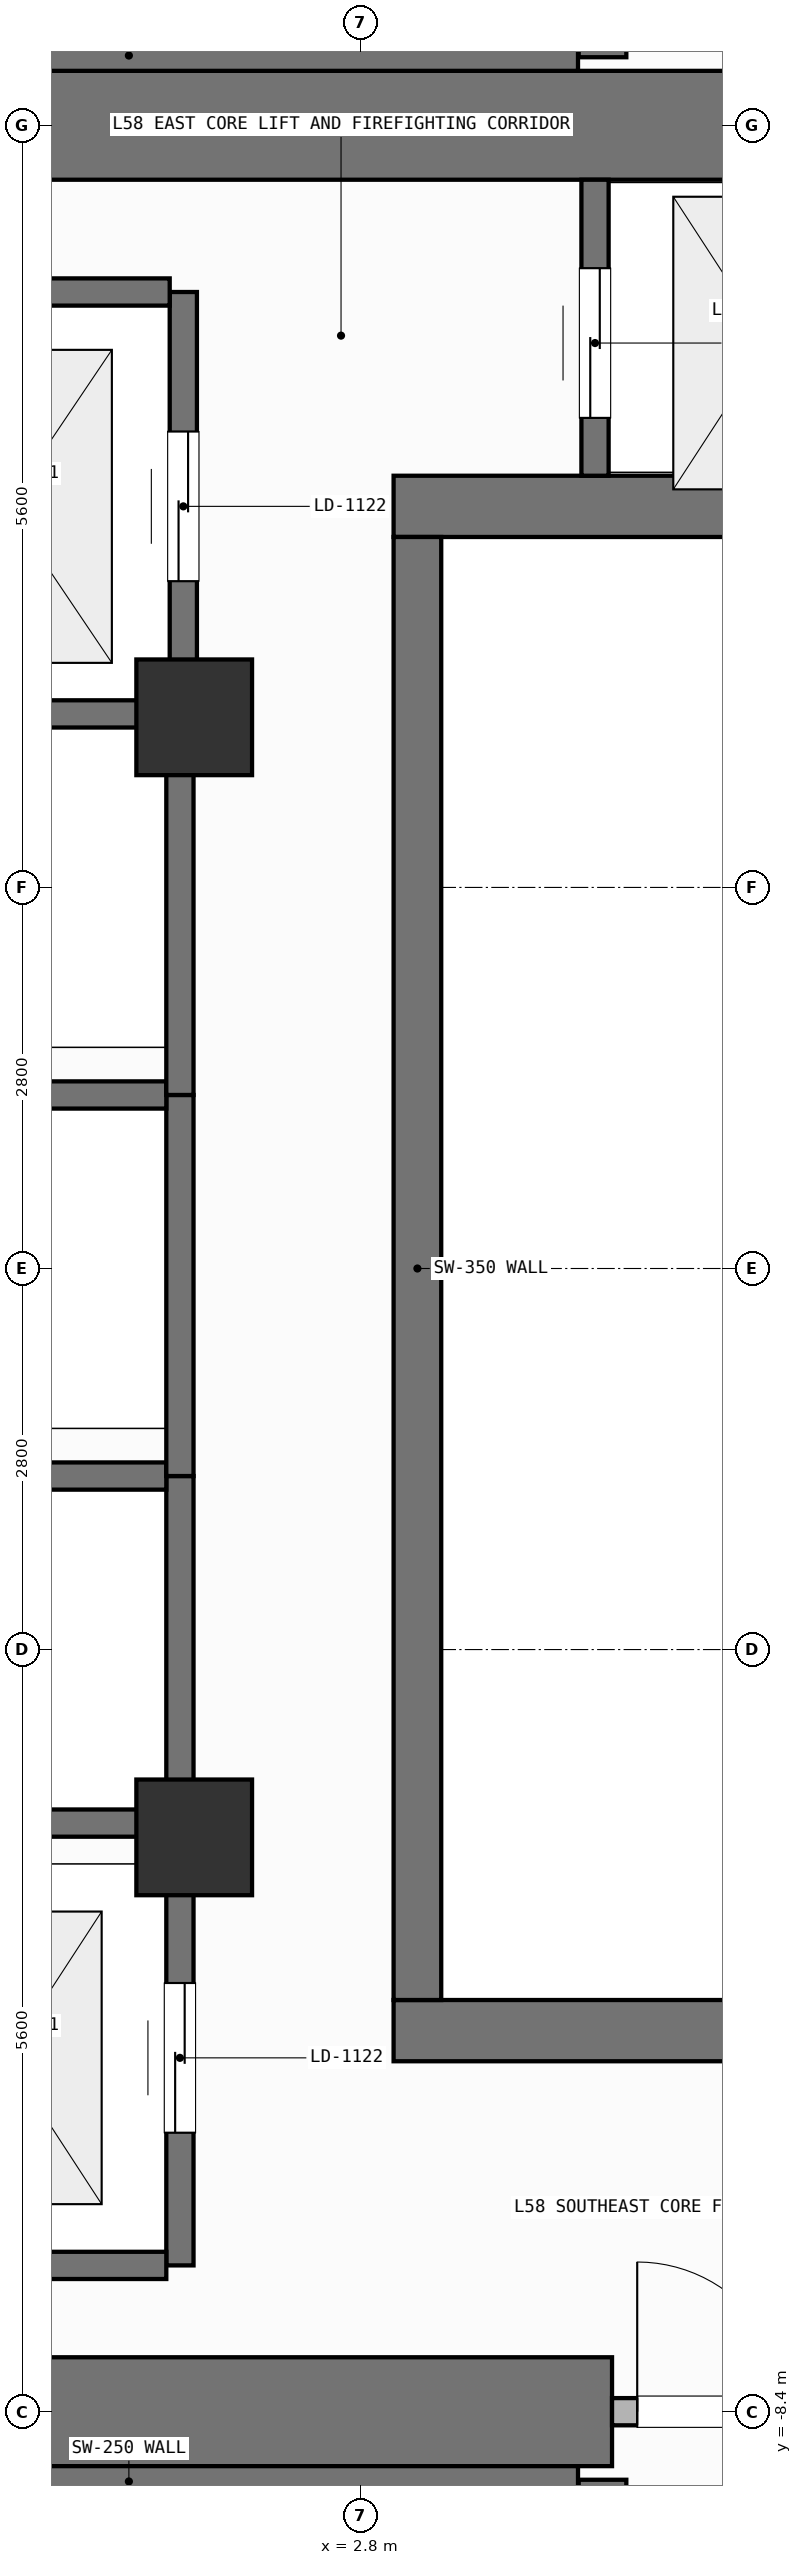
"""IFC4 building model, lengths in metres.
Left out: names, types, materials, properties, quantities, classifications, styles, units other than length and angle.
Written with IfcOpenShell. Run it as: python <this file> out.ifc"""

import sys

from ifc_helpers import new_model, si_unit, direction, frame, frame_2d, origin, origin_2d, place, context, subcontext, project, spatial, rectangle, extrude, element, fill, save


model = new_model("IFC4")
c1 = context("Model", 3, precision=1e-05, world=origin(), true_north=direction((0.0, 1.0)))
c2 = subcontext(c1, "Body", "Model", "MODEL_VIEW")
j1 = project(units=[si_unit("LENGTHUNIT", "METRE"), si_unit("PLANEANGLEUNIT", "RADIAN")], contexts=[c1])
p1 = place(None, origin())
s1 = spatial("IfcSite", under=j1, at=p1, CompositionType="ELEMENT")
p2 = place(p1, origin())
s2 = spatial("IfcBuilding", under=s1, at=p2, CompositionType="ELEMENT")
p3 = place(p2, frame((0.0, 0.0, 235.2)))
s3 = spatial("IfcBuildingStorey", under=s2, at=p3, CompositionType="ELEMENT", Elevation=235.2)
p4 = place(p3, frame((-2.62, -8.4, 0.0), z_axis=(0.0, 0.0, 1.0), x_axis=(1.0, 0.0, 0.0)))
e1 = element("IfcWall", 1, at=p4, inside=s3, PredefinedType="SHEAR", context=c2, shape_type="SweptSolid", body=[
    extrude(rectangle(XDim=7.27, YDim=0.8, at=frame_2d((3.635, 0.0))), origin(), (0.0, 0.0, 1.0), 7.8),
])
p5 = place(p3, frame((-7.55, 8.4, 0.0), z_axis=(0.0, 0.0, 1.0), x_axis=(1.0, 0.0, 0.0)))
e2 = element("IfcWall", 2, at=p5, inside=s3, PredefinedType="SHEAR", context=c2, shape_type="SweptSolid", body=[
    extrude(rectangle(XDim=16.35, YDim=0.8, at=frame_2d((8.175, 0.0))), origin(), (0.0, 0.0, 1.0), 7.8),
])
for number, where, z_axis, x_axis in (
    (3, (3.045, -5.6, 0.0), (0.0, 0.0, 1.0), (1.0, 0.0, 0.0)),
    (4, (3.045, 5.6, 0.0), (0.0, 0.0, 1.0), (1.0, 0.0, 0.0)),
):
    element("IfcWall", number, at=place(p3, frame(where, z_axis=z_axis, x_axis=x_axis)), inside=s3, PredefinedType="SHEAR", context=c2, shape_type="SweptSolid", body=[
        extrude(rectangle(XDim=5.755, YDim=0.45, at=frame_2d((2.877, 0.0))), origin(), (0.0, 0.0, 1.0), 7.8),
    ])
p6 = place(p3, frame((3.22, -5.375, 0.0), z_axis=(0.0, 0.0, 1.0), x_axis=(0.0, 1.0, 0.0)))
e5 = element("IfcWall", 5, at=p6, inside=s3, PredefinedType="SHEAR", context=c2, shape_type="SweptSolid", body=[
    extrude(rectangle(XDim=10.75, YDim=0.35, at=frame_2d((5.375, 0.0))), origin(), (0.0, 0.0, 1.0), 7.8),
])
p7 = place(p3, frame((-2.2, -8.913, 0.0), z_axis=(0.0, 0.0, 1.0), x_axis=(1.0, 0.0, 0.0)))
e6 = element("IfcWall", 6, at=p7, inside=s3, PredefinedType="SHEAR", context=c2, shape_type="SweptSolid", body=[
    extrude(rectangle(XDim=6.6, YDim=0.225, at=frame_2d((3.3, 0.0))), origin(), (0.0, 0.0, 1.0), 7.8),
])
p8 = place(p3, frame((4.58, -8.9, 0.0), z_axis=(0.0, 0.0, 1.0), x_axis=(0.0, -1.0, 0.0)))
e7 = element("IfcWall", 7, at=p8, inside=s3, PredefinedType="SHEAR", context=c2, shape_type="SweptSolid", body=[
    extrude(rectangle(XDim=2.925, YDim=0.35, at=frame_2d((1.462, 0.0))), origin(), (0.0, 0.0, 1.0), 7.8),
])
p9 = place(p8, frame((0.913, 0.0, 0.0)))
e8 = element("IfcOpeningElement", 8, at=p9, cuts=e7, PredefinedType="OPENING", context=c2, shape_type="SweptSolid", body=[
    extrude(rectangle(XDim=1.1, YDim=2.15, at=frame_2d((0.55, 1.075))), frame((0.0, 0.185, 0.0), z_axis=(0.0, -1.0, 0.0), x_axis=(1.0, 0.0, 0.0)), (0.0, 0.0, 1.0), 0.37),
])
p10 = place(p3, frame((-2.2, 8.913, 0.0), z_axis=(0.0, 0.0, 1.0), x_axis=(1.0, 0.0, 0.0)))
e9 = element("IfcWall", 9, at=p10, inside=s3, PredefinedType="SHEAR", context=c2, shape_type="SweptSolid", body=[
    extrude(rectangle(XDim=6.6, YDim=0.225, at=frame_2d((3.3, 0.0))), origin(), (0.0, 0.0, 1.0), 7.8),
])
p11 = place(p3, frame((4.58, 11.825, 0.0), z_axis=(0.0, 0.0, 1.0), x_axis=(0.0, -1.0, 0.0)))
e10 = element("IfcWall", 10, at=p11, inside=s3, PredefinedType="SHEAR", context=c2, shape_type="SweptSolid", body=[
    extrude(rectangle(XDim=2.925, YDim=0.35, at=frame_2d((1.462, 0.0))), origin(), (0.0, 0.0, 1.0), 7.8),
])
p12 = place(p11, frame((0.913, 0.0, 0.0)))
e11 = element("IfcOpeningElement", 11, at=p12, cuts=e10, PredefinedType="OPENING", context=c2, shape_type="SweptSolid", body=[
    extrude(rectangle(XDim=1.1, YDim=2.15, at=frame_2d((0.55, 1.075))), frame((0.0, 0.185, 0.0), z_axis=(0.0, -1.0, 0.0), x_axis=(1.0, 0.0, 0.0)), (0.0, 0.0, 1.0), 0.37),
])
for number, where, z_axis, x_axis in (
    (12, (1.58, -4.18, 0.0), (0.0, 0.0, 1.0), (1.0, 0.0, 0.0)),
    (13, (1.58, 4.05, 0.0), (0.0, 0.0, 1.0), (1.0, 0.0, 0.0)),
):
    element("IfcColumn", number, at=place(p3, frame(where, z_axis=z_axis, x_axis=x_axis)), inside=s3, PredefinedType="COLUMN", context=c2, shape_type="SweptSolid", body=[
        extrude(rectangle(XDim=0.85, YDim=0.85, at=origin_2d()), origin(), (0.0, 0.0, 1.0), 7.8),
    ])
p13 = place(p3, frame((1.475, -4.275, 0.0), z_axis=(0.0, 0.0, 1.0), x_axis=(0.0, 1.0, 0.0)))
e14 = element("IfcWall", 14, at=p13, inside=s3, PredefinedType="SHEAR", context=c2, shape_type="SweptSolid", body=[
    extrude(rectangle(XDim=2.75, YDim=0.2, at=frame_2d((1.375, 0.0))), origin(), (0.0, 0.0, 1.0), 7.58),
])
for number, where, z_axis, x_axis in (
    (15, (-0.975, -4.075, 0.0), (0.0, 0.0, 1.0), (1.0, 0.0, 0.0)),
    (16, (-0.975, -1.525, 0.0), (0.0, 0.0, 1.0), (1.0, 0.0, 0.0)),
):
    element("IfcWall", number, at=place(p3, frame(where, z_axis=z_axis, x_axis=x_axis)), inside=s3, PredefinedType="SHEAR", context=c2, shape_type="SweptSolid", body=[
        extrude(rectangle(XDim=2.35, YDim=0.2, at=frame_2d((1.175, 0.0))), origin(), (0.0, 0.0, 1.0), 7.58),
    ])
p14 = place(p3, frame((1.475, -1.525, 0.0), z_axis=(0.0, 0.0, 1.0), x_axis=(0.0, 1.0, 0.0)))
e17 = element("IfcWall", 17, at=p14, inside=s3, PredefinedType="SHEAR", context=c2, shape_type="SweptSolid", body=[
    extrude(rectangle(XDim=2.8, YDim=0.2, at=frame_2d((1.4, 0.0))), origin(), (0.0, 0.0, 1.0), 7.58),
])
p15 = place(p3, frame((-0.975, 1.275, 0.0), z_axis=(0.0, 0.0, 1.0), x_axis=(1.0, 0.0, 0.0)))
e18 = element("IfcWall", 18, at=p15, inside=s3, PredefinedType="SHEAR", context=c2, shape_type="SweptSolid", body=[
    extrude(rectangle(XDim=2.35, YDim=0.2, at=frame_2d((1.175, 0.0))), origin(), (0.0, 0.0, 1.0), 7.58),
])
p16 = place(p3, frame((1.475, 1.275, 0.0), z_axis=(0.0, 0.0, 1.0), x_axis=(0.0, 1.0, 0.0)))
e19 = element("IfcWall", 19, at=p16, inside=s3, PredefinedType="SHEAR", context=c2, shape_type="SweptSolid", body=[
    extrude(rectangle(XDim=2.8, YDim=0.2, at=frame_2d((1.4, 0.0))), origin(), (0.0, 0.0, 1.0), 7.58),
])
p17 = place(p3, frame((-0.975, 4.075, 0.0), z_axis=(0.0, 0.0, 1.0), x_axis=(1.0, 0.0, 0.0)))
e20 = element("IfcWall", 20, at=p17, inside=s3, PredefinedType="SHEAR", context=c2, shape_type="SweptSolid", body=[
    extrude(rectangle(XDim=2.35, YDim=0.2, at=frame_2d((1.175, 0.0))), origin(), (0.0, 0.0, 1.0), 7.58),
])
p18 = place(p3, frame((1.5, 4.025, 0.0), z_axis=(0.0, 0.0, 1.0), x_axis=(0.0, 1.0, 0.0)))
e21 = element("IfcWall", 21, at=p18, inside=s3, PredefinedType="SHEAR", context=c2, shape_type="SweptSolid", body=[
    extrude(rectangle(XDim=3.15, YDim=0.2, at=frame_2d((1.575, 0.0))), origin(), (0.0, 0.0, 1.0), 7.58),
])
p19 = place(p18, frame((1.025, 0.0, 0.0)))
e22 = element("IfcOpeningElement", 22, at=p19, cuts=e21, PredefinedType="OPENING", context=c2, shape_type="SweptSolid", body=[
    extrude(rectangle(XDim=1.1, YDim=2.2, at=frame_2d((0.55, 1.1))), frame((0.0, 0.11, 0.0), z_axis=(0.0, -1.0, 0.0), x_axis=(1.0, 0.0, 0.0)), (0.0, 0.0, 1.0), 0.22),
])
p20 = place(p3, frame((-1.0, 7.175, 0.0), z_axis=(0.0, 0.0, 1.0), x_axis=(1.0, 0.0, 0.0)))
e23 = element("IfcWall", 23, at=p20, inside=s3, PredefinedType="SHEAR", context=c2, shape_type="SweptSolid", body=[
    extrude(rectangle(XDim=2.4, YDim=0.2, at=frame_2d((1.2, 0.0))), origin(), (0.0, 0.0, 1.0), 7.58),
])
p21 = place(p3, frame((1.475, -7.325, 0.0), z_axis=(0.0, 0.0, 1.0), x_axis=(0.0, 1.0, 0.0)))
e24 = element("IfcWall", 24, at=p21, inside=s3, PredefinedType="SHEAR", context=c2, shape_type="SweptSolid", body=[
    extrude(rectangle(XDim=3.05, YDim=0.2, at=frame_2d((1.525, 0.0))), origin(), (0.0, 0.0, 1.0), 7.58),
])
p22 = place(p21, frame((0.975, 0.0, 0.0)))
e25 = element("IfcOpeningElement", 25, at=p22, cuts=e24, PredefinedType="OPENING", context=c2, shape_type="SweptSolid", body=[
    extrude(rectangle(XDim=1.1, YDim=2.2, at=frame_2d((0.55, 1.1))), frame((0.0, 0.11, 0.0), z_axis=(0.0, -1.0, 0.0), x_axis=(1.0, 0.0, 0.0)), (0.0, 0.0, 1.0), 0.22),
])
p23 = place(p3, frame((-0.975, -7.325, 0.0), z_axis=(0.0, 0.0, 1.0), x_axis=(1.0, 0.0, 0.0)))
e26 = element("IfcWall", 26, at=p23, inside=s3, PredefinedType="SHEAR", context=c2, shape_type="SweptSolid", body=[
    extrude(rectangle(XDim=2.35, YDim=0.2, at=frame_2d((1.175, 0.0))), origin(), (0.0, 0.0, 1.0), 7.58),
])
p24 = place(p3, frame((4.525, 5.825, 0.0), z_axis=(0.0, 0.0, 1.0), x_axis=(0.0, 1.0, 0.0)))
e27 = element("IfcWall", 27, at=p24, inside=s3, PredefinedType="SHEAR", context=c2, shape_type="SweptSolid", body=[
    extrude(rectangle(XDim=2.175, YDim=0.2, at=frame_2d((1.087, 0.0))), origin(), (0.0, 0.0, 1.0), 7.58),
])
p25 = place(p24, frame((0.425, 0.0, 0.0)))
e28 = element("IfcOpeningElement", 28, at=p25, cuts=e27, PredefinedType="OPENING", context=c2, shape_type="SweptSolid", body=[
    extrude(rectangle(XDim=1.1, YDim=2.2, at=frame_2d((0.55, 1.1))), frame((0.0, 0.11, 0.0), z_axis=(0.0, -1.0, 0.0), x_axis=(1.0, 0.0, 0.0)), (0.0, 0.0, 1.0), 0.22),
])
p26 = place(p3, frame((4.65, -8.4, 0.0), z_axis=(0.0, 0.0, 1.0), x_axis=(1.0, 0.0, 0.0)))
e29 = element("IfcWall", 29, at=p26, inside=s3, PredefinedType="SOLIDWALL", context=c2, shape_type="SweptSolid", body=[
    extrude(rectangle(XDim=1.47, YDim=0.2, at=frame_2d((0.735, 0.0))), origin(), (0.0, 0.0, 1.0), 6.72),
])
p27 = place(p26, frame((0.185, 0.0, 0.0)))
e30 = element("IfcOpeningElement", 30, at=p27, cuts=e29, PredefinedType="OPENING", context=c2, shape_type="SweptSolid", body=[
    extrude(rectangle(XDim=1.1, YDim=2.15, at=frame_2d((0.55, 1.075))), frame((0.0, 0.11, 0.0), z_axis=(0.0, -1.0, 0.0), x_axis=(1.0, 0.0, 0.0)), (0.0, 0.0, 1.0), 0.22),
])
p28 = place(p19, origin())
e31 = element("IfcDoor", 31, at=p28, inside=s3, OperationType="SLIDING_TO_LEFT", PredefinedType="DOOR", context=c2, shape_type="SweptSolid", body=[
    extrude(rectangle(XDim=1.1, YDim=2.2, at=frame_2d((0.55, 1.1))), frame((0.0, 0.025, 0.0), z_axis=(0.0, -1.0, 0.0), x_axis=(1.0, 0.0, 0.0)), (0.0, 0.0, 1.0), 0.05),
])
fill(e22, e31)
p29 = place(p22, origin())
e32 = element("IfcDoor", 32, at=p29, inside=s3, OperationType="SLIDING_TO_LEFT", PredefinedType="DOOR", context=c2, shape_type="SweptSolid", body=[
    extrude(rectangle(XDim=1.1, YDim=2.2, at=frame_2d((0.55, 1.1))), frame((0.0, 0.025, 0.0), z_axis=(0.0, -1.0, 0.0), x_axis=(1.0, 0.0, 0.0)), (0.0, 0.0, 1.0), 0.05),
])
fill(e25, e32)
p30 = place(p25, origin())
e33 = element("IfcDoor", 33, at=p30, inside=s3, OperationType="SLIDING_TO_LEFT", PredefinedType="DOOR", context=c2, shape_type="SweptSolid", body=[
    extrude(rectangle(XDim=1.1, YDim=2.2, at=frame_2d((0.55, 1.1))), frame((0.0, 0.025, 0.0), z_axis=(0.0, -1.0, 0.0), x_axis=(1.0, 0.0, 0.0)), (0.0, 0.0, 1.0), 0.05),
])
fill(e28, e33)
p31 = place(p27, origin())
e34 = element("IfcDoor", 34, at=p31, inside=s3, OperationType="SINGLE_SWING_LEFT", PredefinedType="DOOR", context=c2, shape_type="SweptSolid", body=[
    extrude(rectangle(XDim=1.1, YDim=2.15, at=frame_2d((0.55, 1.075))), frame((0.0, 0.025, 0.0), z_axis=(0.0, -1.0, 0.0), x_axis=(1.0, 0.0, 0.0)), (0.0, 0.0, 1.0), 0.05),
])
fill(e30, e34)
save(model, sys.argv[1])
